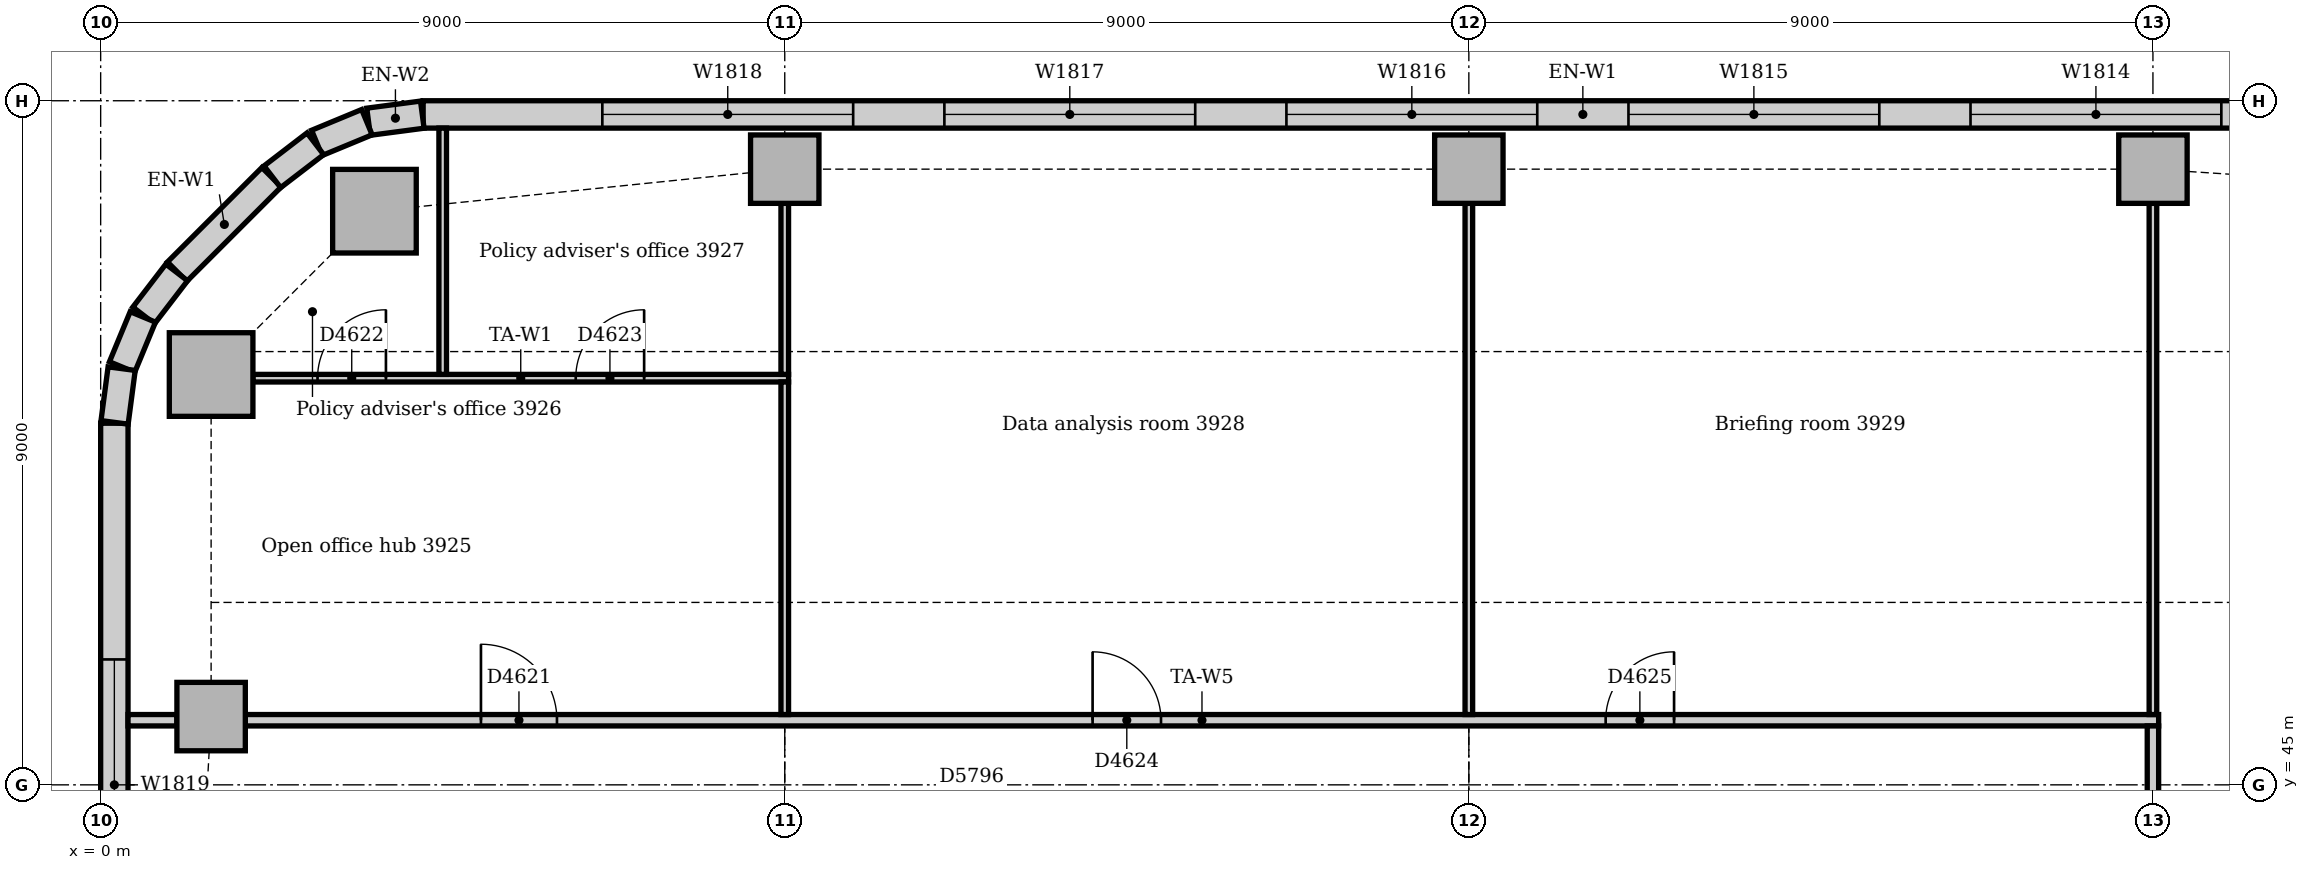
"""IFC4 building model, lengths in metres.
Left out: names, types, materials, properties, quantities, classifications, styles, units other than length and angle.
Written with IfcOpenShell. Run it as: python <this file> out.ifc"""

import sys

from ifc_helpers import new_model, si_unit, direction, frame, frame_2d, origin, origin_2d, place, context, subcontext, project, spatial, rectangle, extrude, element, fill, save


model = new_model("IFC4")
c1 = context("Model", 3, precision=1e-05, world=origin(), true_north=direction((0.0, 1.0)))
c2 = subcontext(c1, "Body", "Model", "MODEL_VIEW")
j1 = project(units=[si_unit("LENGTHUNIT", "METRE"), si_unit("PLANEANGLEUNIT", "RADIAN")], contexts=[c1])
p1 = place(None, origin())
s1 = spatial("IfcSite", under=j1, at=p1, CompositionType="ELEMENT")
p2 = place(p1, origin())
s2 = spatial("IfcBuilding", under=s1, at=p2, CompositionType="ELEMENT")
p3 = place(p2, frame((0.0, 0.0, 165.0)))
s3 = spatial("IfcBuildingStorey", under=s2, at=p3, CompositionType="ELEMENT", Elevation=165.0)
for number, where, z_axis, x_axis in (
    (1, (3.602, 52.547, 0.0), (0.0, 0.0, 1.0), (1.0, 0.0, 0.0)),
    (2, (1.453, 50.398, 0.0), (0.0, 0.0, 1.0), (1.0, 0.0, 0.0)),
):
    element("IfcColumn", number, at=place(p3, frame(where, z_axis=z_axis, x_axis=x_axis)), inside=s3, PredefinedType="COLUMN", context=c2, shape_type="SweptSolid", body=[
        extrude(rectangle(XDim=1.1, YDim=1.1, at=origin_2d()), origin(), (0.0, 0.0, 1.0), 3.85),
    ])
for number, where, z_axis, x_axis in (
    (3, (9.0, 53.1, 0.0), (0.0, 0.0, 1.0), (1.0, 0.0, 0.0)),
    (4, (18.0, 53.1, 0.0), (0.0, 0.0, 1.0), (1.0, 0.0, 0.0)),
    (5, (27.0, 53.1, 0.0), (0.0, 0.0, 1.0), (1.0, 0.0, 0.0)),
    (6, (1.453, 45.898, 0.0), (0.0, 0.0, 1.0), (1.0, 0.0, 0.0)),
):
    element("IfcColumn", number, at=place(p3, frame(where, z_axis=z_axis, x_axis=x_axis)), inside=s3, PredefinedType="COLUMN", context=c2, shape_type="SweptSolid", body=[
        extrude(rectangle(XDim=0.9, YDim=0.9, at=origin_2d()), origin(), (0.0, 0.0, 1.0), 3.85),
    ])
p4 = place(p3, frame((34.757, 53.82, 0.0), z_axis=(0.0, 0.0, 1.0), x_axis=(-1.0, 0.0, 0.0)))
e7 = element("IfcWall", 7, at=p4, inside=s3, PredefinedType="STANDARD", context=c2, shape_type="SweptSolid", body=[
    extrude(rectangle(XDim=30.515, YDim=0.36, at=frame_2d((15.257, 0.0))), origin(), (0.0, 0.0, 1.0), 3.85),
])
p5 = place(p4, frame((2.357, 0.0, 0.9)))
e8 = element("IfcOpeningElement", 8, at=p5, cuts=e7, PredefinedType="OPENING", context=c2, shape_type="SweptSolid", body=[
    extrude(rectangle(XDim=3.3, YDim=1.6, at=frame_2d((1.65, 0.8))), frame((0.0, 0.19, 0.0), z_axis=(0.0, -1.0, 0.0), x_axis=(1.0, 0.0, 0.0)), (0.0, 0.0, 1.0), 0.38),
])
p6 = place(p4, frame((6.857, 0.0, 0.9)))
e9 = element("IfcOpeningElement", 9, at=p6, cuts=e7, PredefinedType="OPENING", context=c2, shape_type="SweptSolid", body=[
    extrude(rectangle(XDim=3.3, YDim=1.6, at=frame_2d((1.65, 0.8))), frame((0.0, 0.19, 0.0), z_axis=(0.0, -1.0, 0.0), x_axis=(1.0, 0.0, 0.0)), (0.0, 0.0, 1.0), 0.38),
])
p7 = place(p4, frame((11.357, 0.0, 0.9)))
e10 = element("IfcOpeningElement", 10, at=p7, cuts=e7, PredefinedType="OPENING", context=c2, shape_type="SweptSolid", body=[
    extrude(rectangle(XDim=3.3, YDim=1.6, at=frame_2d((1.65, 0.8))), frame((0.0, 0.19, 0.0), z_axis=(0.0, -1.0, 0.0), x_axis=(1.0, 0.0, 0.0)), (0.0, 0.0, 1.0), 0.38),
])
p8 = place(p4, frame((15.857, 0.0, 0.9)))
e11 = element("IfcOpeningElement", 11, at=p8, cuts=e7, PredefinedType="OPENING", context=c2, shape_type="SweptSolid", body=[
    extrude(rectangle(XDim=3.3, YDim=1.6, at=frame_2d((1.65, 0.8))), frame((0.0, 0.19, 0.0), z_axis=(0.0, -1.0, 0.0), x_axis=(1.0, 0.0, 0.0)), (0.0, 0.0, 1.0), 0.38),
])
p9 = place(p4, frame((20.357, 0.0, 0.9)))
e12 = element("IfcOpeningElement", 12, at=p9, cuts=e7, PredefinedType="OPENING", context=c2, shape_type="SweptSolid", body=[
    extrude(rectangle(XDim=3.3, YDim=1.6, at=frame_2d((1.65, 0.8))), frame((0.0, 0.19, 0.0), z_axis=(0.0, -1.0, 0.0), x_axis=(1.0, 0.0, 0.0)), (0.0, 0.0, 1.0), 0.38),
])
p10 = place(p4, frame((24.857, 0.0, 0.9)))
e13 = element("IfcOpeningElement", 13, at=p10, cuts=e7, PredefinedType="OPENING", context=c2, shape_type="SweptSolid", body=[
    extrude(rectangle(XDim=3.3, YDim=1.6, at=frame_2d((1.65, 0.8))), frame((0.0, 0.19, 0.0), z_axis=(0.0, -1.0, 0.0), x_axis=(1.0, 0.0, 0.0)), (0.0, 0.0, 1.0), 0.38),
])
p11 = place(p3, frame((2.249, 52.994, 0.0), z_axis=(0.0, 0.0, 1.0), x_axis=(-0.707106781187, -0.707106781187, 0.0)))
e14 = element("IfcWall", 14, at=p11, inside=s3, PredefinedType="STANDARD", context=c2, shape_type="SweptSolid", body=[
    extrude(rectangle(XDim=1.757, YDim=0.36, at=frame_2d((0.879, 0.0))), origin(), (0.0, 0.0, 1.0), 3.85),
])
p12 = place(p3, frame((0.18, 49.757, 0.0), z_axis=(0.0, 0.0, 1.0), x_axis=(0.0, -1.0, 0.0)))
e15 = element("IfcWall", 15, at=p12, inside=s3, PredefinedType="STANDARD", context=c2, shape_type="SweptSolid", body=[
    extrude(rectangle(XDim=7.757, YDim=0.36, at=frame_2d((3.879, 0.0))), origin(), (0.0, 0.0, 1.0), 3.85),
])
p13 = place(p12, frame((3.107, 0.0, 0.9)))
e16 = element("IfcOpeningElement", 16, at=p13, cuts=e15, PredefinedType="OPENING", context=c2, shape_type="SweptSolid", body=[
    extrude(rectangle(XDim=3.3, YDim=1.6, at=frame_2d((1.65, 0.8))), frame((0.0, 0.19, 0.0), z_axis=(0.0, -1.0, 0.0), x_axis=(1.0, 0.0, 0.0)), (0.0, 0.0, 1.0), 0.38),
])
for number, where, z_axis, x_axis in (
    (17, (4.231, 53.817, 0.0), (0.0, 0.0, 1.0), (-0.991, -0.131, 0.0)),
    (18, (3.503, 53.718, 0.0), (0.0, 0.0, 1.0), (-0.924, -0.383, 0.0)),
):
    element("IfcWall", number, at=place(p3, frame(where, z_axis=z_axis, x_axis=x_axis)), inside=s3, PredefinedType="STANDARD", context=c2, shape_type="SweptSolid", body=[
        extrude(rectangle(XDim=0.713, YDim=0.36, at=frame_2d((0.356, 0.0))), origin(), (0.0, 0.0, 1.0), 3.85),
    ])
for number, where, z_axis, x_axis in (
    (19, (2.825, 53.434, 0.0), (0.0, 0.0, 1.0), (-0.793, -0.609, 0.0)),
    (20, (1.0, 51.741, 0.0), (0.0, 0.0, 1.0), (-0.609, -0.793, 0.0)),
):
    element("IfcWall", number, at=place(p3, frame(where, z_axis=z_axis, x_axis=x_axis)), inside=s3, PredefinedType="STANDARD", context=c2, shape_type="SweptSolid", body=[
        extrude(rectangle(XDim=0.713, YDim=0.36, at=frame_2d((0.357, 0.0))), origin(), (0.0, 0.0, 1.0), 3.85),
    ])
for number, where, z_axis, x_axis in (
    (21, (0.555, 51.156, 0.0), (0.0, 0.0, 1.0), (-0.383, -0.924, 0.0)),
    (22, (0.276, 50.476, 0.0), (0.0, 0.0, 1.0), (-0.131, -0.991, 0.0)),
):
    element("IfcWall", number, at=place(p3, frame(where, z_axis=z_axis, x_axis=x_axis)), inside=s3, PredefinedType="STANDARD", context=c2, shape_type="SweptSolid", body=[
        extrude(rectangle(XDim=0.713, YDim=0.36, at=frame_2d((0.356, 0.0))), origin(), (0.0, 0.0, 1.0), 3.85),
    ])
p14 = place(p3, frame((1.903, 45.85, 0.0), z_axis=(0.0, 0.0, 1.0), x_axis=(1.0, 0.0, 0.0)))
e23 = element("IfcWall", 23, at=p14, inside=s3, PredefinedType="PARTITIONING", context=c2, shape_type="SweptSolid", body=[
    extrude(rectangle(XDim=25.172, YDim=0.15, at=frame_2d((12.586, 0.0))), origin(), (0.0, 0.0, 1.0), 3.85),
])
p15 = place(p14, frame((3.1, 0.0, 0.0)))
e24 = element("IfcOpeningElement", 24, at=p15, cuts=e23, PredefinedType="OPENING", context=c2, shape_type="SweptSolid", body=[
    extrude(rectangle(XDim=1.0, YDim=2.1, at=frame_2d((0.5, 1.05))), frame((0.0, 0.085, 0.0), z_axis=(0.0, -1.0, 0.0), x_axis=(1.0, 0.0, 0.0)), (0.0, 0.0, 1.0), 0.17),
])
p16 = place(p14, frame((11.147, 0.0, 0.0)))
e25 = element("IfcOpeningElement", 25, at=p16, cuts=e23, PredefinedType="OPENING", context=c2, shape_type="SweptSolid", body=[
    extrude(rectangle(XDim=0.9, YDim=2.1, at=frame_2d((0.45, 1.05))), frame((0.0, 0.085, 0.0), z_axis=(0.0, -1.0, 0.0), x_axis=(1.0, 0.0, 0.0)), (0.0, 0.0, 1.0), 0.17),
])
p17 = place(p14, frame((17.897, 0.0, 0.0)))
e26 = element("IfcOpeningElement", 26, at=p17, cuts=e23, PredefinedType="OPENING", context=c2, shape_type="SweptSolid", body=[
    extrude(rectangle(XDim=0.9, YDim=2.1, at=frame_2d((0.45, 1.05))), frame((0.0, 0.085, 0.0), z_axis=(0.0, -1.0, 0.0), x_axis=(1.0, 0.0, 0.0)), (0.0, 0.0, 1.0), 0.17),
])
p18 = place(p3, frame((0.36, 45.85, 0.0), z_axis=(0.0, 0.0, 1.0), x_axis=(1.0, 0.0, 0.0)))
e27 = element("IfcWall", 27, at=p18, inside=s3, PredefinedType="PARTITIONING", context=c2, shape_type="SweptSolid", body=[
    extrude(rectangle(XDim=0.643, YDim=0.15, at=frame_2d((0.322, 0.0))), origin(), (0.0, 0.0, 1.0), 3.85),
])
p19 = place(p3, frame((27.0, 44.55, 0.0), z_axis=(0.0, 0.0, 1.0), x_axis=(0.0, 1.0, 0.0)))
e28 = element("IfcWall", 28, at=p19, inside=s3, PredefinedType="PARTITIONING", context=c2, shape_type="SweptSolid", body=[
    extrude(rectangle(XDim=1.225, YDim=0.15, at=frame_2d((0.613, 0.0))), origin(), (0.0, 0.0, 1.0), 3.362),
])
p20 = place(p3, frame((2.003, 50.35, 0.0), z_axis=(0.0, 0.0, 1.0), x_axis=(1.0, 0.0, 0.0)))
e29 = element("IfcWall", 29, at=p20, inside=s3, PredefinedType="PARTITIONING", context=c2, shape_type="SweptSolid", body=[
    extrude(rectangle(XDim=7.047, YDim=0.1, at=frame_2d((3.523, 0.0))), origin(), (0.0, 0.0, 1.0), 3.85),
])
p21 = place(p20, frame((0.85, 0.0, 0.0)))
e30 = element("IfcOpeningElement", 30, at=p21, cuts=e29, PredefinedType="OPENING", context=c2, shape_type="SweptSolid", body=[
    extrude(rectangle(XDim=0.9, YDim=2.1, at=frame_2d((0.45, 1.05))), frame((0.0, 0.06, 0.0), z_axis=(0.0, -1.0, 0.0), x_axis=(1.0, 0.0, 0.0)), (0.0, 0.0, 1.0), 0.12),
])
p22 = place(p20, frame((4.247, 0.0, 0.0)))
e31 = element("IfcOpeningElement", 31, at=p22, cuts=e29, PredefinedType="OPENING", context=c2, shape_type="SweptSolid", body=[
    extrude(rectangle(XDim=0.9, YDim=2.1, at=frame_2d((0.45, 1.05))), frame((0.0, 0.06, 0.0), z_axis=(0.0, -1.0, 0.0), x_axis=(1.0, 0.0, 0.0)), (0.0, 0.0, 1.0), 0.12),
])
p23 = place(p3, frame((9.0, 45.925, 0.0), z_axis=(0.0, 0.0, 1.0), x_axis=(0.0, 1.0, 0.0)))
e32 = element("IfcWall", 32, at=p23, inside=s3, PredefinedType="PARTITIONING", context=c2, shape_type="SweptSolid", body=[
    extrude(rectangle(XDim=4.375, YDim=0.1, at=frame_2d((2.188, 0.0))), origin(), (0.0, 0.0, 1.0), 3.362),
])
p24 = place(p3, frame((9.0, 50.4, 0.0), z_axis=(0.0, 0.0, 1.0), x_axis=(0.0, 1.0, 0.0)))
e33 = element("IfcWall", 33, at=p24, inside=s3, PredefinedType="PARTITIONING", context=c2, shape_type="SweptSolid", body=[
    extrude(rectangle(XDim=2.25, YDim=0.1, at=frame_2d((1.125, 0.0))), origin(), (0.0, 0.0, 1.0), 3.362),
])
for number, where, z_axis, x_axis in (
    (34, (18.0, 45.925, 0.0), (0.0, 0.0, 1.0), (0.0, 1.0, 0.0)),
    (35, (27.0, 45.925, 0.0), (0.0, 0.0, 1.0), (0.0, 1.0, 0.0)),
):
    element("IfcWall", number, at=place(p3, frame(where, z_axis=z_axis, x_axis=x_axis)), inside=s3, PredefinedType="PARTITIONING", context=c2, shape_type="SweptSolid", body=[
        extrude(rectangle(XDim=6.725, YDim=0.1, at=frame_2d((3.362, 0.0))), origin(), (0.0, 0.0, 1.0), 3.362),
    ])
p25 = place(p3, frame((4.5, 50.4, 0.0), z_axis=(0.0, 0.0, 1.0), x_axis=(0.0, 1.0, 0.0)))
e36 = element("IfcWall", 36, at=p25, inside=s3, PredefinedType="PARTITIONING", context=c2, shape_type="SweptSolid", body=[
    extrude(rectangle(XDim=3.24, YDim=0.1, at=frame_2d((1.62, 0.0))), origin(), (0.0, 0.0, 1.0), 3.85),
])
p26 = place(p6, origin())
e37 = element("IfcWindow", 37, at=p26, inside=s3, PartitioningType="SINGLE_PANEL", PredefinedType="WINDOW", context=c2, shape_type="SweptSolid", body=[
    extrude(rectangle(XDim=3.3, YDim=1.6, at=frame_2d((1.65, 0.8))), frame((0.0, 0.13, 0.0), z_axis=(0.0, -1.0, 0.0), x_axis=(1.0, 0.0, 0.0)), (0.0, 0.0, 1.0), 0.06),
])
fill(e9, e37)
p27 = place(p7, origin())
e38 = element("IfcWindow", 38, at=p27, inside=s3, PartitioningType="SINGLE_PANEL", PredefinedType="WINDOW", context=c2, shape_type="SweptSolid", body=[
    extrude(rectangle(XDim=3.3, YDim=1.6, at=frame_2d((1.65, 0.8))), frame((0.0, 0.13, 0.0), z_axis=(0.0, -1.0, 0.0), x_axis=(1.0, 0.0, 0.0)), (0.0, 0.0, 1.0), 0.06),
])
fill(e10, e38)
p28 = place(p8, origin())
e39 = element("IfcWindow", 39, at=p28, inside=s3, PartitioningType="SINGLE_PANEL", PredefinedType="WINDOW", context=c2, shape_type="SweptSolid", body=[
    extrude(rectangle(XDim=3.3, YDim=1.6, at=frame_2d((1.65, 0.8))), frame((0.0, 0.13, 0.0), z_axis=(0.0, -1.0, 0.0), x_axis=(1.0, 0.0, 0.0)), (0.0, 0.0, 1.0), 0.06),
])
fill(e11, e39)
p29 = place(p9, origin())
e40 = element("IfcWindow", 40, at=p29, inside=s3, PartitioningType="SINGLE_PANEL", PredefinedType="WINDOW", context=c2, shape_type="SweptSolid", body=[
    extrude(rectangle(XDim=3.3, YDim=1.6, at=frame_2d((1.65, 0.8))), frame((0.0, 0.13, 0.0), z_axis=(0.0, -1.0, 0.0), x_axis=(1.0, 0.0, 0.0)), (0.0, 0.0, 1.0), 0.06),
])
fill(e12, e40)
p30 = place(p10, origin())
e41 = element("IfcWindow", 41, at=p30, inside=s3, PartitioningType="SINGLE_PANEL", PredefinedType="WINDOW", context=c2, shape_type="SweptSolid", body=[
    extrude(rectangle(XDim=3.3, YDim=1.6, at=frame_2d((1.65, 0.8))), frame((0.0, 0.13, 0.0), z_axis=(0.0, -1.0, 0.0), x_axis=(1.0, 0.0, 0.0)), (0.0, 0.0, 1.0), 0.06),
])
fill(e13, e41)
p31 = place(p13, origin())
e42 = element("IfcWindow", 42, at=p31, inside=s3, PartitioningType="SINGLE_PANEL", PredefinedType="WINDOW", context=c2, shape_type="SweptSolid", body=[
    extrude(rectangle(XDim=3.3, YDim=1.6, at=frame_2d((1.65, 0.8))), frame((0.0, 0.13, 0.0), z_axis=(0.0, -1.0, 0.0), x_axis=(1.0, 0.0, 0.0)), (0.0, 0.0, 1.0), 0.06),
])
fill(e16, e42)
p32 = place(p15, origin())
e43 = element("IfcDoor", 43, at=p32, inside=s3, OperationType="SINGLE_SWING_LEFT", PredefinedType="DOOR", context=c2, shape_type="SweptSolid", body=[
    extrude(rectangle(XDim=1.0, YDim=2.1, at=frame_2d((0.5, 1.05))), frame((0.0, 0.025, 0.0), z_axis=(0.0, -1.0, 0.0), x_axis=(1.0, 0.0, 0.0)), (0.0, 0.0, 1.0), 0.05),
])
fill(e24, e43)
p33 = place(p21, origin())
e44 = element("IfcDoor", 44, at=p33, inside=s3, OperationType="SINGLE_SWING_RIGHT", PredefinedType="DOOR", context=c2, shape_type="SweptSolid", body=[
    extrude(rectangle(XDim=0.9, YDim=2.1, at=frame_2d((0.45, 1.05))), frame((0.0, 0.025, 0.0), z_axis=(0.0, -1.0, 0.0), x_axis=(1.0, 0.0, 0.0)), (0.0, 0.0, 1.0), 0.05),
])
fill(e30, e44)
p34 = place(p22, origin())
e45 = element("IfcDoor", 45, at=p34, inside=s3, OperationType="SINGLE_SWING_RIGHT", PredefinedType="DOOR", context=c2, shape_type="SweptSolid", body=[
    extrude(rectangle(XDim=0.9, YDim=2.1, at=frame_2d((0.45, 1.05))), frame((0.0, 0.025, 0.0), z_axis=(0.0, -1.0, 0.0), x_axis=(1.0, 0.0, 0.0)), (0.0, 0.0, 1.0), 0.05),
])
fill(e31, e45)
p35 = place(p16, origin())
e46 = element("IfcDoor", 46, at=p35, inside=s3, OperationType="SINGLE_SWING_LEFT", PredefinedType="DOOR", context=c2, shape_type="SweptSolid", body=[
    extrude(rectangle(XDim=0.9, YDim=2.1, at=frame_2d((0.45, 1.05))), frame((0.0, 0.025, 0.0), z_axis=(0.0, -1.0, 0.0), x_axis=(1.0, 0.0, 0.0)), (0.0, 0.0, 1.0), 0.05),
])
fill(e25, e46)
p36 = place(p17, origin())
e47 = element("IfcDoor", 47, at=p36, inside=s3, OperationType="SINGLE_SWING_RIGHT", PredefinedType="DOOR", context=c2, shape_type="SweptSolid", body=[
    extrude(rectangle(XDim=0.9, YDim=2.1, at=frame_2d((0.45, 1.05))), frame((0.0, 0.025, 0.0), z_axis=(0.0, -1.0, 0.0), x_axis=(1.0, 0.0, 0.0)), (0.0, 0.0, 1.0), 0.05),
])
fill(e26, e47)
save(model, sys.argv[1])
